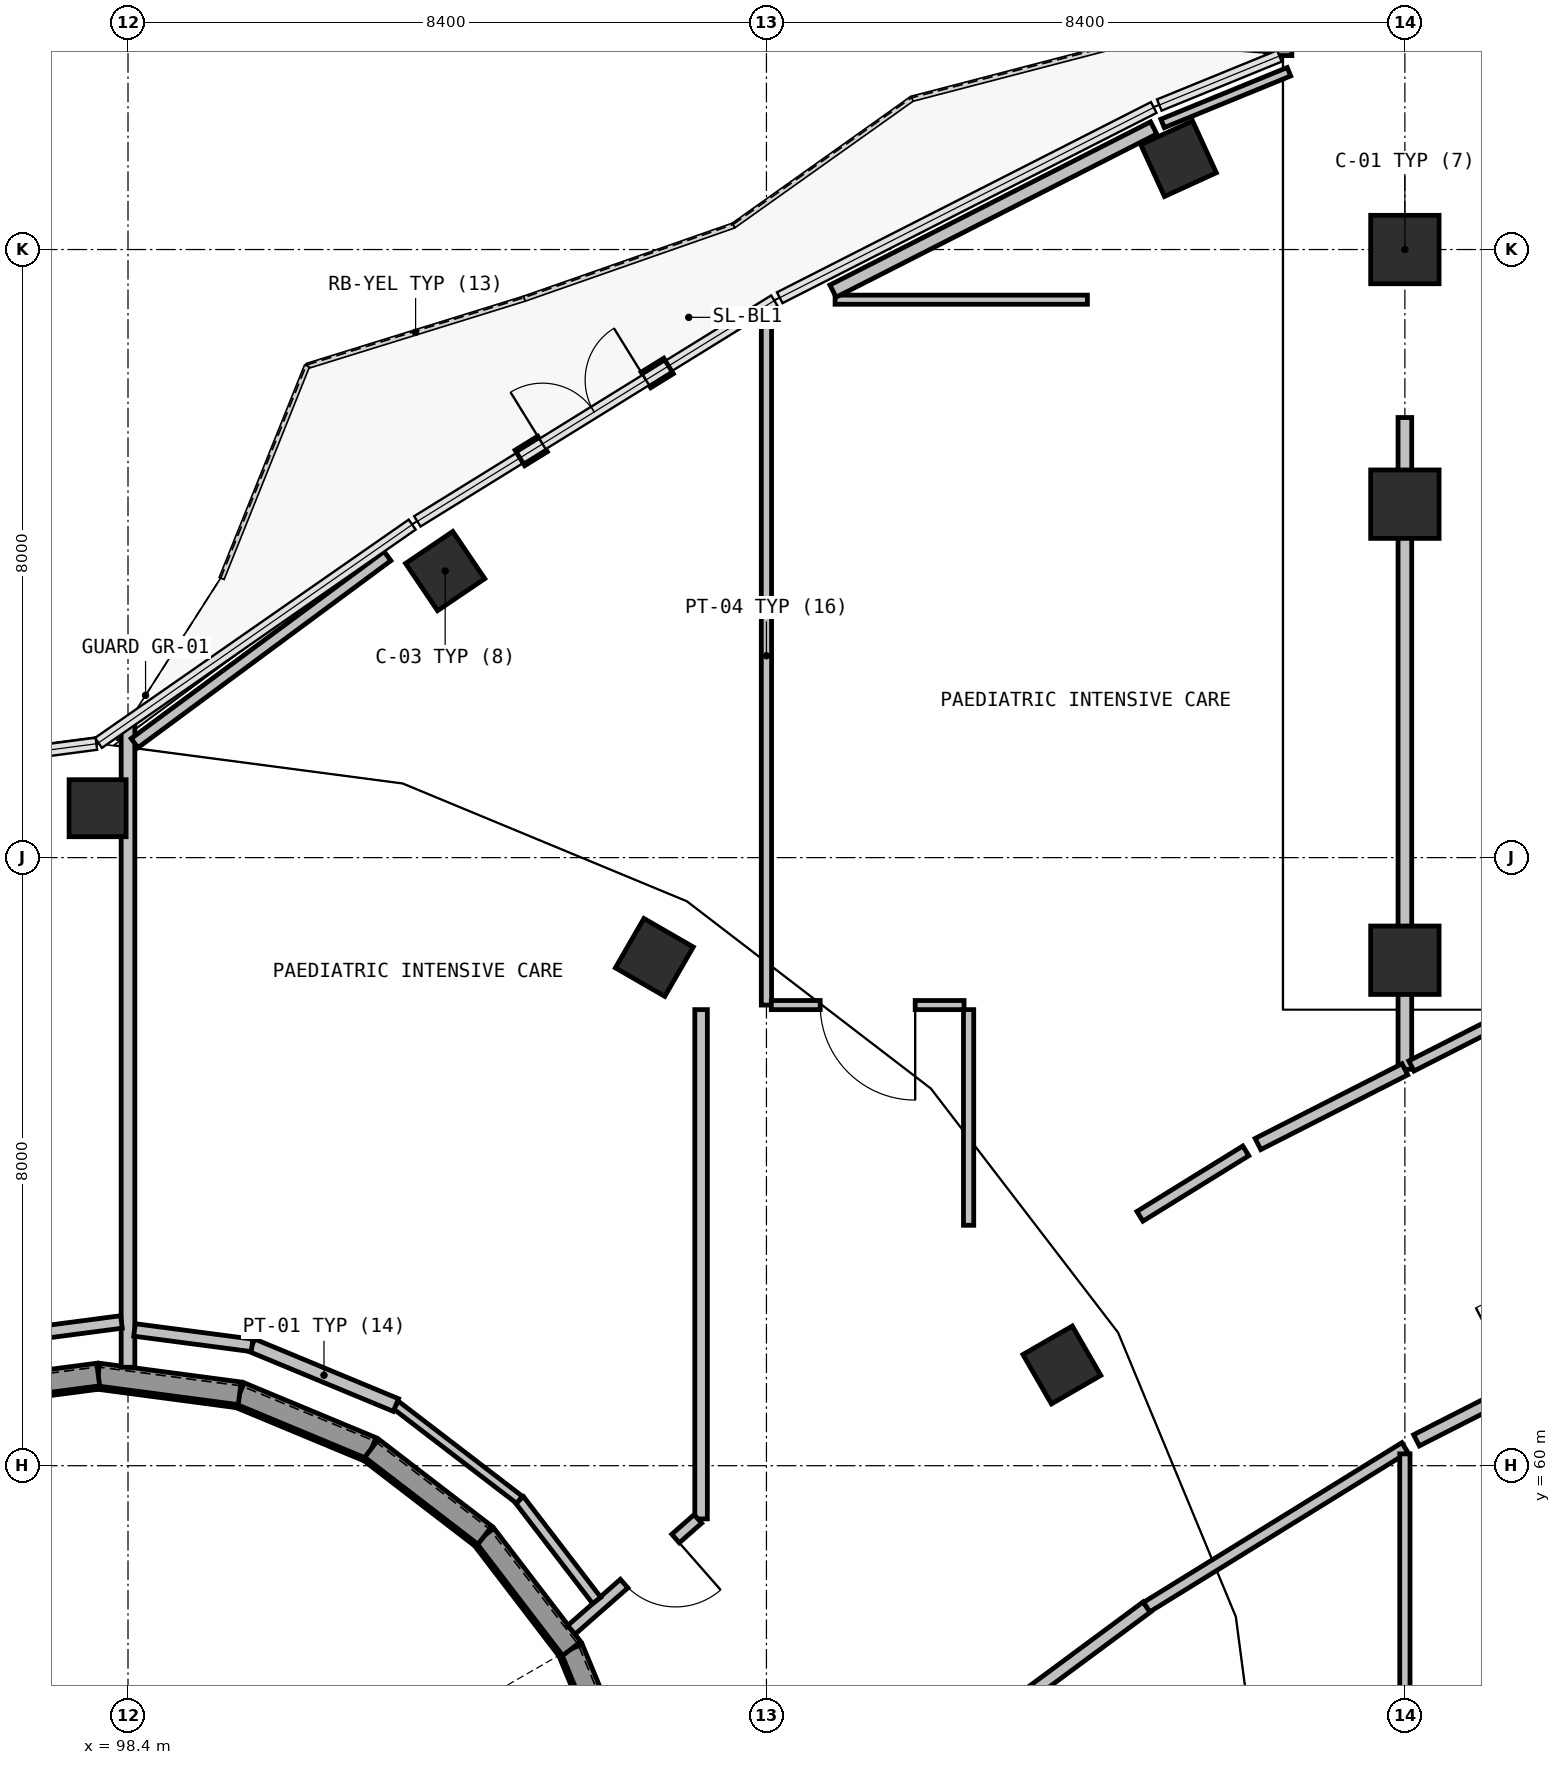
"""IFC4 building model, lengths in metres.
Left out: names, types, materials, properties, quantities, classifications, styles, units other than length and angle.
Written with IfcOpenShell. Run it as: python <this file> out.ifc"""

import sys

from ifc_helpers import new_model, si_unit, direction, frame, frame_2d, origin, origin_2d, place, context, subcontext, project, spatial, rectangle, circle, extrude, element, fill, save


model = new_model("IFC4")
c1 = context("Model", 3, precision=1e-05, world=origin(), true_north=direction((0.0, 1.0)))
c2 = subcontext(c1, "Body", "Model", "MODEL_VIEW")
j1 = project(units=[si_unit("LENGTHUNIT", "METRE"), si_unit("PLANEANGLEUNIT", "RADIAN")], contexts=[c1])
p1 = place(None, origin())
s1 = spatial("IfcSite", under=j1, at=p1, CompositionType="ELEMENT")
p2 = place(p1, origin())
s2 = spatial("IfcBuilding", under=s1, at=p2, CompositionType="ELEMENT")
p3 = place(p2, frame((0.0, 0.0, 5.4)))
s3 = spatial("IfcBuildingStorey", under=s2, at=p3, CompositionType="ELEMENT", Elevation=5.4)
for number, where, z_axis, x_axis in (
    (1, (110.687, 61.325, 0.0), (0.0, 0.0, 1.0), (0.866, 0.5, 0.0)),
    (2, (105.325, 66.687, 0.0), (0.0, 0.0, 1.0), (0.5, 0.866, 0.0)),
    (3, (98.0, 68.65, 0.0), (0.0, 0.0, 1.0), (0.0, 1.0, 0.0)),
):
    element("IfcColumn", number, at=place(p3, frame(where, z_axis=z_axis, x_axis=x_axis)), inside=s3, PredefinedType="COLUMN", context=c2, shape_type="SweptSolid", body=[
        extrude(circle(Radius=0.375, at=origin_2d()), origin(), (0.0, 0.0, 1.0), 4.8),
    ])
for number, where, z_axis, x_axis in (
    (4, (115.2, 66.65, 0.0), (0.0, 0.0, 1.0), (1.0, 0.0, 0.0)),
    (5, (115.2, 72.65, 0.0), (0.0, 0.0, 1.0), (1.0, 0.0, 0.0)),
    (6, (115.2, 76.0, 0.0), (0.0, 0.0, 1.0), (1.0, 0.0, 0.0)),
):
    element("IfcColumn", number, at=place(p3, frame(where, z_axis=z_axis, x_axis=x_axis)), inside=s3, PredefinedType="COLUMN", context=c2, shape_type="SweptSolid", body=[
        extrude(rectangle(XDim=0.9, YDim=0.9, at=origin_2d()), origin(), (0.0, 0.0, 1.0), 4.8),
    ])
for number, where, z_axis, x_axis in (
    (7, (102.573, 71.77, 0.0), (0.0, 0.0, 1.0), (-0.561, 0.828, 0.0)),
    (8, (112.222, 77.195, 0.0), (0.0, 0.0, 1.0), (-0.416, 0.909, 0.0)),
):
    element("IfcColumn", number, at=place(p3, frame(where, z_axis=z_axis, x_axis=x_axis)), inside=s3, PredefinedType="COLUMN", context=c2, shape_type="SweptSolid", body=[
        extrude(rectangle(XDim=0.75, YDim=0.75, at=origin_2d()), origin(), (0.0, 0.0, 1.0), 4.8),
    ])
p4 = place(p3, frame((103.556, 73.258, 0.0), z_axis=(0.0, 0.0, 1.0), x_axis=(0.85044606758, 0.526062245498, 0.0)))
e9 = element("IfcWall", 9, at=p4, inside=s3, PredefinedType="SOLIDWALL", context=c2, shape_type="SweptSolid", body=[
    extrude(rectangle(XDim=2.3, YDim=0.24, at=frame_2d((1.15, 0.0))), origin(), (0.0, 0.0, 1.0), 2.32),
])
p5 = place(p4, frame((0.35, 0.0, 0.0)))
e10 = element("IfcOpeningElement", 10, at=p5, cuts=e9, PredefinedType="OPENING", context=c2, shape_type="SweptSolid", body=[
    extrude(rectangle(XDim=1.6, YDim=2.2, at=frame_2d((0.8, 1.1))), frame((0.0, 0.13, 0.0), z_axis=(0.0, -1.0, 0.0), x_axis=(1.0, 0.0, 0.0)), (0.0, 0.0, 1.0), 0.26),
])
p6 = place(p3, frame((113.563, 78.552, 0.0), z_axis=(0.0, 0.0, 1.0), x_axis=(0.006887325881, 0.99997628209, 0.0)))
e11 = element("IfcWall", 11, at=p6, inside=s3, PredefinedType="SOLIDWALL", context=c2, shape_type="SweptSolid", body=[
    extrude(rectangle(XDim=5.388, YDim=0.3, at=frame_2d((2.694, 0.0))), origin(), (0.0, 0.0, 1.0), 4.445),
])
p7 = place(p6, frame((2.094, 0.0, 0.96)))
e12 = element("IfcOpeningElement", 12, at=p7, cuts=e11, PredefinedType="OPENING", context=c2, shape_type="SweptSolid", body=[
    extrude(rectangle(XDim=1.2, YDim=1.2, at=frame_2d((0.6, 0.6))), frame((0.0, 0.16, 0.0), z_axis=(0.0, -1.0, 0.0), x_axis=(1.0, 0.0, 0.0)), (0.0, 0.0, 1.0), 0.32),
])
p8 = place(p3, frame((101.606, 60.23, 0.0), z_axis=(0.0, 0.0, 1.0), x_axis=(-0.923330302292, 0.384006709406, 0.0)))
e13 = element("IfcWall", 13, at=p8, inside=s3, PredefinedType="SOLIDWALL", context=c2, shape_type="SweptSolid", body=[
    extrude(rectangle(XDim=1.88, YDim=0.3, at=frame_2d((0.94, 0.0))), origin(), (0.0, 0.0, 1.0), 4.445),
])
p9 = place(p3, frame((99.87, 60.952, 0.0), z_axis=(0.0, 0.0, 1.0), x_axis=(-0.991311701137, 0.131533688416, 0.0)))
e14 = element("IfcWall", 14, at=p9, inside=s3, PredefinedType="SOLIDWALL", context=c2, shape_type="SweptSolid", body=[
    extrude(rectangle(XDim=1.878, YDim=0.3, at=frame_2d((0.939, 0.0))), origin(), (0.0, 0.0, 1.0), 4.445),
])
p10 = place(p3, frame((98.008, 61.199, 0.0), z_axis=(0.0, 0.0, 1.0), x_axis=(-0.991606206969, -0.129294741965, 0.0)))
e15 = element("IfcWall", 15, at=p10, inside=s3, PredefinedType="SOLIDWALL", context=c2, shape_type="SweptSolid", body=[
    extrude(rectangle(XDim=1.879, YDim=0.3, at=frame_2d((0.939, 0.0))), origin(), (0.0, 0.0, 1.0), 4.445),
])
p11 = place(p3, frame((104.956, 55.855, 0.0), z_axis=(0.0, 0.0, 1.0), x_axis=(-0.381820428435, 0.924236528401, 0.0)))
e16 = element("IfcWall", 16, at=p11, inside=s3, PredefinedType="SOLIDWALL", context=c2, shape_type="SweptSolid", body=[
    extrude(rectangle(XDim=1.881, YDim=0.3, at=frame_2d((0.94, 0.0))), origin(), (0.0, 0.0, 1.0), 4.445),
])
p12 = place(p3, frame((104.238, 57.593, 0.0), z_axis=(0.0, 0.0, 1.0), x_axis=(-0.607850341861, 0.79405161161, 0.0)))
e17 = element("IfcWall", 17, at=p12, inside=s3, PredefinedType="SOLIDWALL", context=c2, shape_type="SweptSolid", body=[
    extrude(rectangle(XDim=1.879, YDim=0.3, at=frame_2d((0.939, 0.0))), origin(), (0.0, 0.0, 1.0), 4.445),
])
p13 = place(p3, frame((103.096, 59.085, 0.0), z_axis=(0.0, 0.0, 1.0), x_axis=(-0.792913688324, 0.609333966613, 0.0)))
e18 = element("IfcWall", 18, at=p13, inside=s3, PredefinedType="SOLIDWALL", context=c2, shape_type="SweptSolid", body=[
    extrude(rectangle(XDim=1.879, YDim=0.3, at=frame_2d((0.939, 0.0))), origin(), (0.0, 0.0, 1.0), 4.445),
])
p14 = place(p3, frame((98.4, 69.766, 0.0), z_axis=(0.0, 0.0, 1.0), x_axis=(0.0, -1.0, 0.0)))
e19 = element("IfcWall", 19, at=p14, inside=s3, PredefinedType="PARTITIONING", context=c2, shape_type="SweptSolid", body=[
    extrude(rectangle(XDim=8.471, YDim=0.18, at=frame_2d((4.236, 0.0))), origin(), (0.0, 0.0, 1.0), 4.445),
])
p15 = place(p3, frame((98.314, 61.891, 0.0), z_axis=(0.0, 0.0, 1.0), x_axis=(-0.991485524019, -0.130216956115, 0.0)))
e20 = element("IfcWall", 20, at=p15, inside=s3, PredefinedType="PARTITIONING", context=c2, shape_type="SweptSolid", body=[
    extrude(rectangle(XDim=2.366, YDim=0.165, at=frame_2d((1.183, 0.0))), origin(), (0.0, 0.0, 1.0), 4.445),
])
p16 = place(p3, frame((105.94, 66.0, 0.0), z_axis=(0.0, 0.0, 1.0), x_axis=(0.0, -1.0, 0.0)))
e21 = element("IfcWall", 21, at=p16, inside=s3, PredefinedType="PARTITIONING", context=c2, shape_type="SweptSolid", body=[
    extrude(rectangle(XDim=6.7, YDim=0.165, at=frame_2d((3.35, 0.0))), origin(), (0.0, 0.0, 1.0), 4.445),
])
p17 = place(p3, frame((105.898, 59.3, 0.0), z_axis=(0.0, 0.0, 1.0), x_axis=(-0.751701560076, -0.65950342272, 0.0)))
e22 = element("IfcWall", 22, at=p17, inside=s3, PredefinedType="PARTITIONING", context=c2, shape_type="SweptSolid", body=[
    extrude(rectangle(XDim=2.214, YDim=0.15, at=frame_2d((1.107, 0.0))), origin(), (0.0, 0.0, 1.0), 4.445),
])
p18 = place(p17, frame((0.391, 0.0, 0.0)))
e23 = element("IfcOpeningElement", 23, at=p18, cuts=e22, PredefinedType="OPENING", context=c2, shape_type="SweptSolid", body=[
    extrude(rectangle(XDim=0.9, YDim=2.1, at=frame_2d((0.45, 1.05))), frame((0.0, 0.085, 0.0), z_axis=(0.0, -1.0, 0.0), x_axis=(1.0, 0.0, 0.0)), (0.0, 0.0, 1.0), 0.17),
])
p19 = place(p3, frame((104.567, 58.227, 0.0), z_axis=(0.0, 0.0, 1.0), x_axis=(-0.608741699994, 0.793368478507, 0.0)))
e24 = element("IfcWall", 24, at=p19, inside=s3, PredefinedType="PARTITIONING", context=c2, shape_type="SweptSolid", body=[
    extrude(rectangle(XDim=1.669, YDim=0.135, at=frame_2d((0.834, 0.0))), origin(), (0.0, 0.0, 1.0), 4.445),
])
p20 = place(p3, frame((103.551, 59.551, 0.0), z_axis=(0.0, 0.0, 1.0), x_axis=(-0.793491289639, 0.608581607729, 0.0)))
e25 = element("IfcWall", 25, at=p20, inside=s3, PredefinedType="PARTITIONING", context=c2, shape_type="SweptSolid", body=[
    extrude(rectangle(XDim=2.049, YDim=0.12, at=frame_2d((1.024, 0.0))), origin(), (0.0, 0.0, 1.0), 4.445),
])
p21 = place(p3, frame((101.925, 60.798, 0.0), z_axis=(0.0, 0.0, 1.0), x_axis=(-0.923745197655, 0.383007584532, 0.0)))
e26 = element("IfcWall", 26, at=p21, inside=s3, PredefinedType="PARTITIONING", context=c2, shape_type="SweptSolid", body=[
    extrude(rectangle(XDim=2.049, YDim=0.18, at=frame_2d((1.025, 0.0))), origin(), (0.0, 0.0, 1.0), 4.445),
])
p22 = place(p3, frame((100.032, 61.583, 0.0), z_axis=(0.0, 0.0, 1.0), x_axis=(-0.991497943081, 0.130122361134, 0.0)))
e27 = element("IfcWall", 27, at=p22, inside=s3, PredefinedType="PARTITIONING", context=c2, shape_type="SweptSolid", body=[
    extrude(rectangle(XDim=1.559, YDim=0.165, at=frame_2d((0.78, 0.0))), origin(), (0.0, 0.0, 1.0), 4.445),
])
p23 = place(p3, frame((98.486, 69.506, 0.0), z_axis=(0.0, 0.0, 1.0), x_axis=(0.804037596369, 0.594578458763, 0.0)))
e28 = element("IfcWall", 28, at=p23, inside=s3, PredefinedType="PARTITIONING", context=c2, shape_type="SweptSolid", body=[
    extrude(rectangle(XDim=4.139, YDim=0.15, at=frame_2d((2.069, 0.0))), origin(), (0.0, 0.0, 1.0), 4.445),
])
p24 = place(p3, frame((106.8, 75.251, 0.0), z_axis=(0.0, 0.0, 1.0), x_axis=(0.0, -1.0, 0.0)))
e29 = element("IfcWall", 29, at=p24, inside=s3, PredefinedType="PARTITIONING", context=c2, shape_type="SweptSolid", body=[
    extrude(rectangle(XDim=9.191, YDim=0.135, at=frame_2d((4.595, 0.0))), origin(), (0.0, 0.0, 1.0), 4.445),
])
p25 = place(p3, frame((109.46, 56.406, 0.0), z_axis=(0.0, 0.0, 1.0), x_axis=(0.803833088097, 0.594854912125, 0.0)))
e30 = element("IfcWall", 30, at=p25, inside=s3, PredefinedType="PARTITIONING", context=c2, shape_type="SweptSolid", body=[
    extrude(rectangle(XDim=2.915, YDim=0.165, at=frame_2d((1.458, 0.0))), origin(), (0.0, 0.0, 1.0), 4.445),
])
p26 = place(p3, frame((111.803, 58.14, 0.0), z_axis=(0.0, 0.0, 1.0), x_axis=(0.850687032492, 0.525672495714, 0.0)))
e31 = element("IfcWall", 31, at=p26, inside=s3, PredefinedType="PARTITIONING", context=c2, shape_type="SweptSolid", body=[
    extrude(rectangle(XDim=3.993, YDim=0.15, at=frame_2d((1.997, 0.0))), origin(), (0.0, 0.0, 1.0), 4.445),
])
p27 = place(p3, frame((115.2, 60.156, 0.0), z_axis=(0.0, 0.0, 1.0), x_axis=(0.0, -1.0, 0.0)))
e32 = element("IfcWall", 32, at=p27, inside=s3, PredefinedType="PARTITIONING", context=c2, shape_type="SweptSolid", body=[
    extrude(rectangle(XDim=15.556, YDim=0.135, at=frame_2d((7.778, 0.0))), origin(), (0.0, 0.0, 1.0), 4.445),
])
p28 = place(p3, frame((107.703, 75.34, 0.0), z_axis=(0.0, 0.0, 1.0), x_axis=(1.0, 0.0, 0.0)))
e33 = element("IfcWall", 33, at=p28, inside=s3, PredefinedType="PARTITIONING", context=c2, shape_type="SweptSolid", body=[
    extrude(rectangle(XDim=3.32, YDim=0.12, at=frame_2d((1.66, 0.0))), origin(), (0.0, 0.0, 1.0), 4.445),
])
p29 = place(p3, frame((115.2, 73.79, 0.0), z_axis=(0.0, 0.0, 1.0), x_axis=(0.0, -1.0, 0.0)))
e34 = element("IfcWall", 34, at=p29, inside=s3, PredefinedType="PARTITIONING", context=c2, shape_type="SweptSolid", body=[
    extrude(rectangle(XDim=8.575, YDim=0.18, at=frame_2d((4.288, 0.0))), origin(), (0.0, 0.0, 1.0), 3.695),
])
p30 = place(p3, frame((115.2, 65.215, 0.0), z_axis=(0.0, 0.0, 1.0), x_axis=(-0.891321133159, -0.45337251525, 0.0)))
e35 = element("IfcWall", 35, at=p30, inside=s3, PredefinedType="PARTITIONING", context=c2, shape_type="SweptSolid", body=[
    extrude(rectangle(XDim=2.168, YDim=0.165, at=frame_2d((1.084, 0.0))), origin(), (0.0, 0.0, 1.0), 4.445),
])
p31 = place(p3, frame((113.107, 64.142, 0.0), z_axis=(0.0, 0.0, 1.0), x_axis=(-0.850576382598, -0.525851516463, 0.0)))
e36 = element("IfcWall", 36, at=p31, inside=s3, PredefinedType="PARTITIONING", context=c2, shape_type="SweptSolid", body=[
    extrude(rectangle(XDim=1.637, YDim=0.15, at=frame_2d((0.819, 0.0))), origin(), (0.0, 0.0, 1.0), 4.445),
])
p32 = place(p3, frame((109.46, 63.163, 0.0), z_axis=(0.0, 0.0, 1.0), x_axis=(0.0, 1.0, 0.0)))
e37 = element("IfcWall", 37, at=p32, inside=s3, PredefinedType="PARTITIONING", context=c2, shape_type="SweptSolid", body=[
    extrude(rectangle(XDim=2.837, YDim=0.135, at=frame_2d((1.418, 0.0))), origin(), (0.0, 0.0, 1.0), 4.445),
])
p33 = place(p3, frame((109.4, 66.06, 0.0), z_axis=(0.0, 0.0, 1.0), x_axis=(-1.0, 0.0, 0.0)))
e38 = element("IfcWall", 38, at=p33, inside=s3, PredefinedType="PARTITIONING", context=c2, shape_type="SweptSolid", body=[
    extrude(rectangle(XDim=2.536, YDim=0.12, at=frame_2d((1.268, 0.0))), origin(), (0.0, 0.0, 1.0), 4.445),
])
p34 = place(p33, frame((0.643, 0.0, 0.0)))
e39 = element("IfcOpeningElement", 39, at=p34, cuts=e38, PredefinedType="OPENING", context=c2, shape_type="SweptSolid", body=[
    extrude(rectangle(XDim=1.25, YDim=2.15, at=frame_2d((0.625, 1.075))), frame((0.0, 0.07, 0.0), z_axis=(0.0, -1.0, 0.0), x_axis=(1.0, 0.0, 0.0)), (0.0, 0.0, 1.0), 0.14),
])
p35 = place(p3, frame((111.895, 77.6, 0.0), z_axis=(0.0, 0.0, 1.0), x_axis=(-0.891217321541, -0.453576548982, 0.0)))
e40 = element("IfcWall", 40, at=p35, inside=s3, PredefinedType="PARTITIONING", context=c2, shape_type="SweptSolid", body=[
    extrude(rectangle(XDim=4.734, YDim=0.18, at=frame_2d((2.367, 0.0))), origin(), (0.0, 0.0, 1.0), 4.445),
])
p36 = place(p3, frame((115.353, 60.334, 0.0), z_axis=(0.0, 0.0, 1.0), x_axis=(0.891282591813, 0.453448278782, 0.0)))
e41 = element("IfcWall", 41, at=p36, inside=s3, PredefinedType="PARTITIONING", context=c2, shape_type="SweptSolid", body=[
    extrude(rectangle(XDim=4.175, YDim=0.165, at=frame_2d((2.087, 0.0))), origin(), (0.0, 0.0, 1.0), 4.445),
])
p37 = place(p36, frame((1.487, 0.0, 0.0)))
e42 = element("IfcOpeningElement", 42, at=p37, cuts=e41, PredefinedType="OPENING", context=c2, shape_type="SweptSolid", body=[
    extrude(rectangle(XDim=1.2, YDim=2.15, at=frame_2d((0.6, 1.075))), frame((0.0, 0.093, 0.0), z_axis=(0.0, -1.0, 0.0), x_axis=(1.0, 0.0, 0.0)), (0.0, 0.0, 1.0), 0.185),
])
p38 = place(p3, frame((117.151, 66.208, 0.0), z_axis=(0.0, 0.0, 1.0), x_axis=(-0.891254866421, -0.453502770753, 0.0)))
e43 = element("IfcWall", 43, at=p38, inside=s3, PredefinedType="PARTITIONING", context=c2, shape_type="SweptSolid", body=[
    extrude(rectangle(XDim=2.093, YDim=0.15, at=frame_2d((1.046, 0.0))), origin(), (0.0, 0.0, 1.0), 4.445),
])
p39 = place(p3, frame((113.675, 78.339, 0.0), z_axis=(0.0, 0.0, 1.0), x_axis=(-0.925581582464, -0.37854819271, 0.0)))
e44 = element("IfcWall", 44, at=p39, inside=s3, PredefinedType="PARTITIONING", context=c2, shape_type="SweptSolid", body=[
    extrude(rectangle(XDim=1.797, YDim=0.12, at=frame_2d((0.898, 0.0))), origin(), (0.0, 0.0, 1.0), 4.445),
])
p40 = place(p5, origin())
e45 = element("IfcDoor", 45, at=p40, inside=s3, OperationType="DOUBLE_DOOR_SINGLE_SWING", PredefinedType="DOOR", context=c2, shape_type="SweptSolid", body=[
    extrude(rectangle(XDim=1.6, YDim=2.2, at=frame_2d((0.8, 1.1))), frame((0.0, 0.025, 0.0), z_axis=(0.0, -1.0, 0.0), x_axis=(1.0, 0.0, 0.0)), (0.0, 0.0, 1.0), 0.05),
])
fill(e10, e45)
p41 = place(p18, origin())
e46 = element("IfcDoor", 46, at=p41, inside=s3, OperationType="SINGLE_SWING_RIGHT", PredefinedType="DOOR", context=c2, shape_type="SweptSolid", body=[
    extrude(rectangle(XDim=0.9, YDim=2.1, at=frame_2d((0.45, 1.05))), frame((0.0, 0.025, 0.0), z_axis=(0.0, -1.0, 0.0), x_axis=(1.0, 0.0, 0.0)), (0.0, 0.0, 1.0), 0.05),
])
fill(e23, e46)
p42 = place(p34, origin())
e47 = element("IfcDoor", 47, at=p42, inside=s3, OperationType="SINGLE_SWING_RIGHT", PredefinedType="DOOR", context=c2, shape_type="SweptSolid", body=[
    extrude(rectangle(XDim=1.25, YDim=2.15, at=frame_2d((0.625, 1.075))), frame((0.0, 0.025, 0.0), z_axis=(0.0, -1.0, 0.0), x_axis=(1.0, 0.0, 0.0)), (0.0, 0.0, 1.0), 0.05),
])
fill(e39, e47)
save(model, sys.argv[1])
